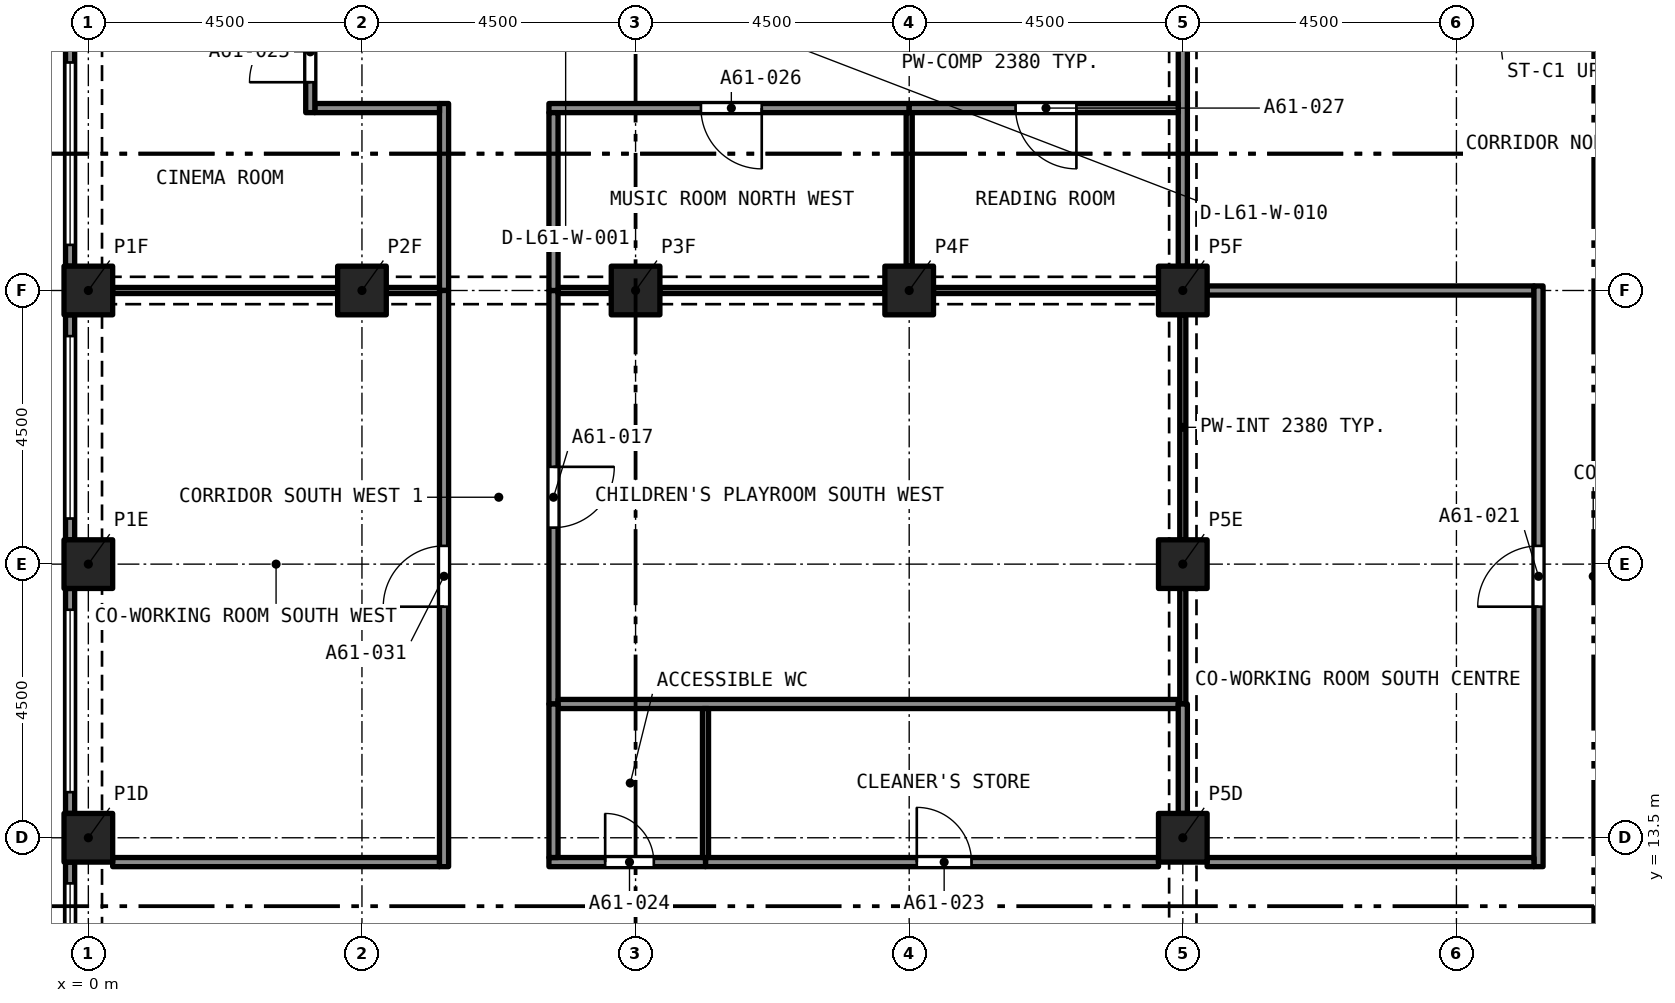
"""IFC4 building model, lengths in metres.
Left out: names, types, materials, properties, quantities, classifications, styles, units other than length and angle.
Written with IfcOpenShell. Run it as: python <this file> out.ifc"""

import sys

from ifc_helpers import new_model, si_unit, direction, frame, frame_2d, origin, origin_2d, place, context, subcontext, project, spatial, rectangle, extrude, element, fill, save


model = new_model("IFC4")
c1 = context("Model", 3, precision=1e-05, world=origin(), true_north=direction((0.0, 1.0)))
c2 = subcontext(c1, "Body", "Model", "MODEL_VIEW")
j1 = project(units=[si_unit("LENGTHUNIT", "METRE"), si_unit("PLANEANGLEUNIT", "RADIAN")], contexts=[c1])
p1 = place(None, origin())
s1 = spatial("IfcSite", under=j1, at=p1, CompositionType="ELEMENT")
p2 = place(p1, origin())
s2 = spatial("IfcBuilding", under=s1, at=p2, CompositionType="ELEMENT")
p3 = place(p2, frame((0.0, 0.0, 219.695)))
s3 = spatial("IfcBuildingStorey", under=s2, at=p3, CompositionType="ELEMENT", Elevation=219.695)
for number, where, z_axis, x_axis in (
    (1, (0.0, 13.5, 0.0), (0.0, 0.0, 1.0), (1.0, 0.0, 0.0)),
    (2, (18.0, 13.5, 0.0), (0.0, 0.0, 1.0), (1.0, 0.0, 0.0)),
    (3, (0.0, 18.0, 0.0), (0.0, 0.0, 1.0), (1.0, 0.0, 0.0)),
    (4, (18.0, 18.0, 0.0), (0.0, 0.0, 1.0), (1.0, 0.0, 0.0)),
    (5, (0.0, 22.5, 0.0), (0.0, 0.0, 1.0), (1.0, 0.0, 0.0)),
    (6, (4.5, 22.5, 0.0), (0.0, 0.0, 1.0), (1.0, 0.0, 0.0)),
    (7, (9.0, 22.5, 0.0), (0.0, 0.0, 1.0), (1.0, 0.0, 0.0)),
    (8, (13.5, 22.5, 0.0), (0.0, 0.0, 1.0), (1.0, 0.0, 0.0)),
    (9, (18.0, 22.5, 0.0), (0.0, 0.0, 1.0), (1.0, 0.0, 0.0)),
):
    element("IfcColumn", number, at=place(p3, frame(where, z_axis=z_axis, x_axis=x_axis)), inside=s3, PredefinedType="COLUMN", context=c2, shape_type="SweptSolid", body=[
        extrude(rectangle(XDim=0.8, YDim=0.8, at=origin_2d()), origin(), (0.0, 0.0, 1.0), 3.2),
    ])
p4 = place(p3, frame((-0.3, 22.9, 0.0), z_axis=(0.0, 0.0, 1.0), x_axis=(0.0, 1.0, 0.0)))
e10 = element("IfcWall", 10, at=p4, inside=s3, PredefinedType="SOLIDWALL", context=c2, shape_type="SweptSolid", body=[
    extrude(rectangle(XDim=3.7, YDim=0.15, at=frame_2d((1.85, 0.0))), origin(), (0.0, 0.0, 1.0), 3.2),
])
p5 = place(p4, frame((0.35, 0.0, 0.45)))
e11 = element("IfcOpeningElement", 11, at=p5, cuts=e10, PredefinedType="OPENING", context=c2, shape_type="SweptSolid", body=[
    extrude(rectangle(XDim=3.0, YDim=1.95, at=frame_2d((1.5, 0.975))), frame((0.0, 0.085, 0.0), z_axis=(0.0, -1.0, 0.0), x_axis=(1.0, 0.0, 0.0)), (0.0, 0.0, 1.0), 0.17),
])
p6 = place(p3, frame((-0.3, 18.4, 0.0), z_axis=(0.0, 0.0, 1.0), x_axis=(0.0, 1.0, 0.0)))
e12 = element("IfcWall", 12, at=p6, inside=s3, PredefinedType="SOLIDWALL", context=c2, shape_type="SweptSolid", body=[
    extrude(rectangle(XDim=3.7, YDim=0.15, at=frame_2d((1.85, 0.0))), origin(), (0.0, 0.0, 1.0), 3.2),
])
p7 = place(p6, frame((0.35, 0.0, 0.45)))
e13 = element("IfcOpeningElement", 13, at=p7, cuts=e12, PredefinedType="OPENING", context=c2, shape_type="SweptSolid", body=[
    extrude(rectangle(XDim=3.0, YDim=1.95, at=frame_2d((1.5, 0.975))), frame((0.0, 0.085, 0.0), z_axis=(0.0, -1.0, 0.0), x_axis=(1.0, 0.0, 0.0)), (0.0, 0.0, 1.0), 0.17),
])
p8 = place(p3, frame((-0.3, 13.9, 0.0), z_axis=(0.0, 0.0, 1.0), x_axis=(0.0, 1.0, 0.0)))
e14 = element("IfcWall", 14, at=p8, inside=s3, PredefinedType="SOLIDWALL", context=c2, shape_type="SweptSolid", body=[
    extrude(rectangle(XDim=3.7, YDim=0.15, at=frame_2d((1.85, 0.0))), origin(), (0.0, 0.0, 1.0), 3.2),
])
p9 = place(p8, frame((0.35, 0.0, 0.45)))
e15 = element("IfcOpeningElement", 15, at=p9, cuts=e14, PredefinedType="OPENING", context=c2, shape_type="SweptSolid", body=[
    extrude(rectangle(XDim=3.0, YDim=1.95, at=frame_2d((1.5, 0.975))), frame((0.0, 0.085, 0.0), z_axis=(0.0, -1.0, 0.0), x_axis=(1.0, 0.0, 0.0)), (0.0, 0.0, 1.0), 0.17),
])
p10 = place(p3, frame((-0.3, 9.4, 0.0), z_axis=(0.0, 0.0, 1.0), x_axis=(0.0, 1.0, 0.0)))
e16 = element("IfcWall", 16, at=p10, inside=s3, PredefinedType="SOLIDWALL", context=c2, shape_type="SweptSolid", body=[
    extrude(rectangle(XDim=3.7, YDim=0.15, at=frame_2d((1.85, 0.0))), origin(), (0.0, 0.0, 1.0), 3.2),
])
p11 = place(p10, frame((0.35, 0.0, 0.45)))
e17 = element("IfcOpeningElement", 17, at=p11, cuts=e16, PredefinedType="OPENING", context=c2, shape_type="SweptSolid", body=[
    extrude(rectangle(XDim=3.0, YDim=1.95, at=frame_2d((1.5, 0.975))), frame((0.0, 0.085, 0.0), z_axis=(0.0, -1.0, 0.0), x_axis=(1.0, 0.0, 0.0)), (0.0, 0.0, 1.0), 0.17),
])
p12 = place(p3, frame((18.0, 18.4, 0.0), z_axis=(0.0, 0.0, 1.0), x_axis=(0.0, 1.0, 0.0)))
e18 = element("IfcWall", 18, at=p12, inside=s3, PredefinedType="PARTITIONING", context=c2, shape_type="SweptSolid", body=[
    extrude(rectangle(XDim=3.7, YDim=0.1, at=frame_2d((1.85, 0.0))), origin(), (0.0, 0.0, 1.0), 2.38),
])
p13 = place(p3, frame((18.0, 15.7, 0.0), z_axis=(0.0, 0.0, 1.0), x_axis=(0.0, 1.0, 0.0)))
e19 = element("IfcWall", 19, at=p13, inside=s3, PredefinedType="PARTITIONING", context=c2, shape_type="SweptSolid", body=[
    extrude(rectangle(XDim=1.9, YDim=0.1, at=frame_2d((0.95, 0.0))), origin(), (0.0, 0.0, 1.0), 2.38),
])
p14 = place(p3, frame((7.65, 22.5, 0.0), z_axis=(0.0, 0.0, 1.0), x_axis=(0.0, -1.0, 0.0)))
e20 = element("IfcWall", 20, at=p14, inside=s3, PredefinedType="PARTITIONING", context=c2, shape_type="SweptSolid", body=[
    extrude(rectangle(XDim=6.8, YDim=0.15, at=frame_2d((3.4, 0.0))), origin(), (0.0, 0.0, 1.0), 2.9),
])
p15 = place(p14, frame((2.9, 0.0, 0.0)))
e21 = element("IfcOpeningElement", 21, at=p15, cuts=e20, PredefinedType="OPENING", context=c2, shape_type="SweptSolid", body=[
    extrude(rectangle(XDim=1.0, YDim=2.1, at=frame_2d((0.5, 1.05))), frame((0.0, 0.085, 0.0), z_axis=(0.0, -1.0, 0.0), x_axis=(1.0, 0.0, 0.0)), (0.0, 0.0, 1.0), 0.17),
])
p16 = place(p3, frame((7.725, 22.5, 0.0), z_axis=(0.0, 0.0, 1.0), x_axis=(1.0, 0.0, 0.0)))
e22 = element("IfcWall", 22, at=p16, inside=s3, PredefinedType="PARTITIONING", context=c2, shape_type="SweptSolid", body=[
    extrude(rectangle(XDim=0.875, YDim=0.1, at=frame_2d((0.438, 0.0))), origin(), (0.0, 0.0, 1.0), 2.38),
])
for number, where, z_axis, x_axis in (
    (23, (9.4, 22.5, 0.0), (0.0, 0.0, 1.0), (1.0, 0.0, 0.0)),
    (24, (13.9, 22.5, 0.0), (0.0, 0.0, 1.0), (1.0, 0.0, 0.0)),
):
    element("IfcWall", number, at=place(p3, frame(where, z_axis=z_axis, x_axis=x_axis)), inside=s3, PredefinedType="PARTITIONING", context=c2, shape_type="SweptSolid", body=[
        extrude(rectangle(XDim=3.7, YDim=0.1, at=frame_2d((1.85, 0.0))), origin(), (0.0, 0.0, 1.0), 2.38),
    ])
p17 = place(p3, frame((7.725, 15.7, 0.0), z_axis=(0.0, 0.0, 1.0), x_axis=(1.0, 0.0, 0.0)))
e25 = element("IfcWall", 25, at=p17, inside=s3, PredefinedType="PARTITIONING", context=c2, shape_type="SweptSolid", body=[
    extrude(rectangle(XDim=10.2, YDim=0.15, at=frame_2d((5.1, 0.0))), origin(), (0.0, 0.0, 1.0), 2.9),
])
p18 = place(p3, frame((18.4, 22.5, 0.0), z_axis=(0.0, 0.0, 1.0), x_axis=(1.0, 0.0, 0.0)))
e26 = element("IfcWall", 26, at=p18, inside=s3, PredefinedType="PARTITIONING", context=c2, shape_type="SweptSolid", body=[
    extrude(rectangle(XDim=5.375, YDim=0.15, at=frame_2d((2.688, 0.0))), origin(), (0.0, 0.0, 1.0), 2.75),
])
p19 = place(p3, frame((18.0, 22.9, 0.0), z_axis=(0.0, 0.0, 1.0), x_axis=(0.0, 1.0, 0.0)))
e27 = element("IfcWall", 27, at=p19, inside=s3, PredefinedType="PARTITIONING", context=c2, shape_type="SweptSolid", body=[
    extrude(rectangle(XDim=3.7, YDim=0.15, at=frame_2d((1.85, 0.0))), origin(), (0.0, 0.0, 1.0), 2.38),
])
p20 = place(p3, frame((23.85, 13.025, 0.0), z_axis=(0.0, 0.0, 1.0), x_axis=(0.0, 1.0, 0.0)))
e28 = element("IfcWall", 28, at=p20, inside=s3, PredefinedType="PARTITIONING", context=c2, shape_type="SweptSolid", body=[
    extrude(rectangle(XDim=9.55, YDim=0.15, at=frame_2d((4.775, 0.0))), origin(), (0.0, 0.0, 1.0), 2.75),
])
p21 = place(p20, frame((4.275, 0.0, 0.0)))
e29 = element("IfcOpeningElement", 29, at=p21, cuts=e28, PredefinedType="OPENING", context=c2, shape_type="SweptSolid", body=[
    extrude(rectangle(XDim=1.0, YDim=2.1, at=frame_2d((0.5, 1.05))), frame((0.0, 0.085, 0.0), z_axis=(0.0, -1.0, 0.0), x_axis=(1.0, 0.0, 0.0)), (0.0, 0.0, 1.0), 0.17),
])
p22 = place(p3, frame((18.4, 13.1, 0.0), z_axis=(0.0, 0.0, 1.0), x_axis=(1.0, 0.0, 0.0)))
e30 = element("IfcWall", 30, at=p22, inside=s3, PredefinedType="PARTITIONING", context=c2, shape_type="SweptSolid", body=[
    extrude(rectangle(XDim=5.375, YDim=0.15, at=frame_2d((2.688, 0.0))), origin(), (0.0, 0.0, 1.0), 2.75),
])
p23 = place(p3, frame((10.15, 13.1, 0.0), z_axis=(0.0, 0.0, 1.0), x_axis=(1.0, 0.0, 0.0)))
e31 = element("IfcWall", 31, at=p23, inside=s3, PredefinedType="PARTITIONING", context=c2, shape_type="SweptSolid", body=[
    extrude(rectangle(XDim=7.45, YDim=0.15, at=frame_2d((3.725, 0.0))), origin(), (0.0, 0.0, 1.0), 2.9),
])
p24 = place(p23, frame((3.475, 0.0, 0.0)))
e32 = element("IfcOpeningElement", 32, at=p24, cuts=e31, PredefinedType="OPENING", context=c2, shape_type="SweptSolid", body=[
    extrude(rectangle(XDim=0.9, YDim=2.1, at=frame_2d((0.45, 1.05))), frame((0.0, 0.085, 0.0), z_axis=(0.0, -1.0, 0.0), x_axis=(1.0, 0.0, 0.0)), (0.0, 0.0, 1.0), 0.17),
])
p25 = place(p3, frame((7.575, 13.1, 0.0), z_axis=(0.0, 0.0, 1.0), x_axis=(1.0, 0.0, 0.0)))
e33 = element("IfcWall", 33, at=p25, inside=s3, PredefinedType="PARTITIONING", context=c2, shape_type="SweptSolid", body=[
    extrude(rectangle(XDim=2.575, YDim=0.15, at=frame_2d((1.288, 0.0))), origin(), (0.0, 0.0, 1.0), 2.9),
])
p26 = place(p25, frame((0.925, 0.0, 0.0)))
e34 = element("IfcOpeningElement", 34, at=p26, cuts=e33, PredefinedType="OPENING", context=c2, shape_type="SweptSolid", body=[
    extrude(rectangle(XDim=0.8, YDim=2.1, at=frame_2d((0.4, 1.05))), frame((0.0, 0.085, 0.0), z_axis=(0.0, -1.0, 0.0), x_axis=(1.0, 0.0, 0.0)), (0.0, 0.0, 1.0), 0.17),
])
p27 = place(p3, frame((0.4, 13.1, 0.0), z_axis=(0.0, 0.0, 1.0), x_axis=(1.0, 0.0, 0.0)))
e35 = element("IfcWall", 35, at=p27, inside=s3, PredefinedType="PARTITIONING", context=c2, shape_type="SweptSolid", body=[
    extrude(rectangle(XDim=5.375, YDim=0.15, at=frame_2d((2.688, 0.0))), origin(), (0.0, 0.0, 1.0), 2.9),
])
p28 = place(p3, frame((18.0, 13.9, 0.0), z_axis=(0.0, 0.0, 1.0), x_axis=(0.0, 1.0, 0.0)))
e36 = element("IfcWall", 36, at=p28, inside=s3, PredefinedType="PARTITIONING", context=c2, shape_type="SweptSolid", body=[
    extrude(rectangle(XDim=1.8, YDim=0.15, at=frame_2d((0.9, 0.0))), origin(), (0.0, 0.0, 1.0), 2.38),
])
p29 = place(p3, frame((5.85, 22.5, 0.0), z_axis=(0.0, 0.0, 1.0), x_axis=(0.0, 1.0, 0.0)))
e37 = element("IfcWall", 37, at=p29, inside=s3, PredefinedType="PARTITIONING", context=c2, shape_type="SweptSolid", body=[
    extrude(rectangle(XDim=3.075, YDim=0.15, at=frame_2d((1.538, 0.0))), origin(), (0.0, 0.0, 1.0), 2.9),
])
p30 = place(p3, frame((3.725, 25.5, 0.0), z_axis=(0.0, 0.0, 1.0), x_axis=(1.0, 0.0, 0.0)))
e38 = element("IfcWall", 38, at=p30, inside=s3, PredefinedType="PARTITIONING", context=c2, shape_type="SweptSolid", body=[
    extrude(rectangle(XDim=2.05, YDim=0.15, at=frame_2d((1.025, 0.0))), origin(), (0.0, 0.0, 1.0), 2.9),
])
p31 = place(p3, frame((3.65, 25.425, 0.0), z_axis=(0.0, 0.0, 1.0), x_axis=(0.0, 1.0, 0.0)))
e39 = element("IfcWall", 39, at=p31, inside=s3, PredefinedType="PARTITIONING", context=c2, shape_type="SweptSolid", body=[
    extrude(rectangle(XDim=1.925, YDim=0.15, at=frame_2d((0.962, 0.0))), origin(), (0.0, 0.0, 1.0), 2.9),
])
p32 = place(p31, frame((0.5, 0.0, 0.0)))
e40 = element("IfcOpeningElement", 40, at=p32, cuts=e39, PredefinedType="OPENING", context=c2, shape_type="SweptSolid", body=[
    extrude(rectangle(XDim=1.0, YDim=2.1, at=frame_2d((0.5, 1.05))), frame((0.0, 0.085, 0.0), z_axis=(0.0, -1.0, 0.0), x_axis=(1.0, 0.0, 0.0)), (0.0, 0.0, 1.0), 0.17),
])
p33 = place(p3, frame((13.5, 25.5, 0.0), z_axis=(0.0, 0.0, 1.0), x_axis=(-1.0, 0.0, 0.0)))
e41 = element("IfcWall", 41, at=p33, inside=s3, PredefinedType="PARTITIONING", context=c2, shape_type="SweptSolid", body=[
    extrude(rectangle(XDim=5.925, YDim=0.15, at=frame_2d((2.962, 0.0))), origin(), (0.0, 0.0, 1.0), 2.9),
])
p34 = place(p33, frame((2.425, 0.0, 0.0)))
e42 = element("IfcOpeningElement", 42, at=p34, cuts=e41, PredefinedType="OPENING", context=c2, shape_type="SweptSolid", body=[
    extrude(rectangle(XDim=1.0, YDim=2.1, at=frame_2d((0.5, 1.05))), frame((0.0, 0.085, 0.0), z_axis=(0.0, -1.0, 0.0), x_axis=(1.0, 0.0, 0.0)), (0.0, 0.0, 1.0), 0.17),
])
p35 = place(p3, frame((7.65, 22.5, 0.0), z_axis=(0.0, 0.0, 1.0), x_axis=(0.0, 1.0, 0.0)))
e43 = element("IfcWall", 43, at=p35, inside=s3, PredefinedType="PARTITIONING", context=c2, shape_type="SweptSolid", body=[
    extrude(rectangle(XDim=2.925, YDim=0.15, at=frame_2d((1.462, 0.0))), origin(), (0.0, 0.0, 1.0), 2.9),
])
p36 = place(p3, frame((17.925, 25.5, 0.0), z_axis=(0.0, 0.0, 1.0), x_axis=(-1.0, 0.0, 0.0)))
e44 = element("IfcWall", 44, at=p36, inside=s3, PredefinedType="PARTITIONING", context=c2, shape_type="SweptSolid", body=[
    extrude(rectangle(XDim=4.425, YDim=0.15, at=frame_2d((2.212, 0.0))), origin(), (0.0, 0.0, 1.0), 2.9),
])
p37 = place(p36, frame((1.675, 0.0, 0.0)))
e45 = element("IfcOpeningElement", 45, at=p37, cuts=e44, PredefinedType="OPENING", context=c2, shape_type="SweptSolid", body=[
    extrude(rectangle(XDim=1.0, YDim=2.1, at=frame_2d((0.5, 1.05))), frame((0.0, 0.085, 0.0), z_axis=(0.0, -1.0, 0.0), x_axis=(1.0, 0.0, 0.0)), (0.0, 0.0, 1.0), 0.17),
])
p38 = place(p3, frame((7.65, 13.175, 0.0), z_axis=(0.0, 0.0, 1.0), x_axis=(0.0, 1.0, 0.0)))
e46 = element("IfcWall", 46, at=p38, inside=s3, PredefinedType="PARTITIONING", context=c2, shape_type="SweptSolid", body=[
    extrude(rectangle(XDim=2.525, YDim=0.15, at=frame_2d((1.262, 0.0))), origin(), (0.0, 0.0, 1.0), 2.9),
])
p39 = place(p3, frame((5.85, 13.025, 0.0), z_axis=(0.0, 0.0, 1.0), x_axis=(0.0, 1.0, 0.0)))
e47 = element("IfcWall", 47, at=p39, inside=s3, PredefinedType="PARTITIONING", context=c2, shape_type="SweptSolid", body=[
    extrude(rectangle(XDim=9.475, YDim=0.15, at=frame_2d((4.738, 0.0))), origin(), (0.0, 0.0, 1.0), 2.9),
])
p40 = place(p39, frame((4.275, 0.0, 0.0)))
e48 = element("IfcOpeningElement", 48, at=p40, cuts=e47, PredefinedType="OPENING", context=c2, shape_type="SweptSolid", body=[
    extrude(rectangle(XDim=1.0, YDim=2.1, at=frame_2d((0.5, 1.05))), frame((0.0, 0.085, 0.0), z_axis=(0.0, -1.0, 0.0), x_axis=(1.0, 0.0, 0.0)), (0.0, 0.0, 1.0), 0.17),
])
p41 = place(p3, frame((4.9, 22.5, 0.0), z_axis=(0.0, 0.0, 1.0), x_axis=(1.0, 0.0, 0.0)))
e49 = element("IfcWall", 49, at=p41, inside=s3, PredefinedType="PARTITIONING", context=c2, shape_type="SweptSolid", body=[
    extrude(rectangle(XDim=0.875, YDim=0.1, at=frame_2d((0.438, 0.0))), origin(), (0.0, 0.0, 1.0), 2.38),
])
p42 = place(p3, frame((0.4, 22.5, 0.0), z_axis=(0.0, 0.0, 1.0), x_axis=(1.0, 0.0, 0.0)))
e50 = element("IfcWall", 50, at=p42, inside=s3, PredefinedType="PARTITIONING", context=c2, shape_type="SweptSolid", body=[
    extrude(rectangle(XDim=3.7, YDim=0.1, at=frame_2d((1.85, 0.0))), origin(), (0.0, 0.0, 1.0), 2.38),
])
p43 = place(p3, frame((13.5, 22.9, 0.0), z_axis=(0.0, 0.0, 1.0), x_axis=(0.0, 1.0, 0.0)))
e51 = element("IfcWall", 51, at=p43, inside=s3, PredefinedType="PARTITIONING", context=c2, shape_type="SweptSolid", body=[
    extrude(rectangle(XDim=2.525, YDim=0.1, at=frame_2d((1.263, 0.0))), origin(), (0.0, 0.0, 1.0), 2.9),
])
p44 = place(p3, frame((10.15, 13.175, 0.0), z_axis=(0.0, 0.0, 1.0), x_axis=(0.0, 1.0, 0.0)))
e52 = element("IfcWall", 52, at=p44, inside=s3, PredefinedType="PARTITIONING", context=c2, shape_type="SweptSolid", body=[
    extrude(rectangle(XDim=2.45, YDim=0.1, at=frame_2d((1.225, 0.0))), origin(), (0.0, 0.0, 1.0), 2.9),
])
p45 = place(p5, origin())
e53 = element("IfcWindow", 53, at=p45, inside=s3, PartitioningType="SINGLE_PANEL", PredefinedType="WINDOW", context=c2, shape_type="SweptSolid", body=[
    extrude(rectangle(XDim=3.0, YDim=1.95, at=frame_2d((1.5, 0.975))), frame((0.0, 0.03, 0.0), z_axis=(0.0, -1.0, 0.0), x_axis=(1.0, 0.0, 0.0)), (0.0, 0.0, 1.0), 0.06),
])
fill(e11, e53)
p46 = place(p7, origin())
e54 = element("IfcWindow", 54, at=p46, inside=s3, PartitioningType="SINGLE_PANEL", PredefinedType="WINDOW", context=c2, shape_type="SweptSolid", body=[
    extrude(rectangle(XDim=3.0, YDim=1.95, at=frame_2d((1.5, 0.975))), frame((0.0, 0.03, 0.0), z_axis=(0.0, -1.0, 0.0), x_axis=(1.0, 0.0, 0.0)), (0.0, 0.0, 1.0), 0.06),
])
fill(e13, e54)
p47 = place(p9, origin())
e55 = element("IfcWindow", 55, at=p47, inside=s3, PartitioningType="SINGLE_PANEL", PredefinedType="WINDOW", context=c2, shape_type="SweptSolid", body=[
    extrude(rectangle(XDim=3.0, YDim=1.95, at=frame_2d((1.5, 0.975))), frame((0.0, 0.03, 0.0), z_axis=(0.0, -1.0, 0.0), x_axis=(1.0, 0.0, 0.0)), (0.0, 0.0, 1.0), 0.06),
])
fill(e15, e55)
p48 = place(p11, origin())
e56 = element("IfcWindow", 56, at=p48, inside=s3, PartitioningType="SINGLE_PANEL", PredefinedType="WINDOW", context=c2, shape_type="SweptSolid", body=[
    extrude(rectangle(XDim=3.0, YDim=1.95, at=frame_2d((1.5, 0.975))), frame((0.0, 0.03, 0.0), z_axis=(0.0, -1.0, 0.0), x_axis=(1.0, 0.0, 0.0)), (0.0, 0.0, 1.0), 0.06),
])
fill(e17, e56)
p49 = place(p15, origin())
e57 = element("IfcDoor", 57, at=p49, inside=s3, OperationType="SINGLE_SWING_LEFT", PredefinedType="DOOR", context=c2, shape_type="SweptSolid", body=[
    extrude(rectangle(XDim=1.0, YDim=2.1, at=frame_2d((0.5, 1.05))), frame((0.0, 0.025, 0.0), z_axis=(0.0, -1.0, 0.0), x_axis=(1.0, 0.0, 0.0)), (0.0, 0.0, 1.0), 0.05),
])
fill(e21, e57)
p50 = place(p21, origin())
e58 = element("IfcDoor", 58, at=p50, inside=s3, OperationType="SINGLE_SWING_RIGHT", PredefinedType="DOOR", context=c2, shape_type="SweptSolid", body=[
    extrude(rectangle(XDim=1.0, YDim=2.1, at=frame_2d((0.5, 1.05))), frame((0.0, 0.025, 0.0), z_axis=(0.0, -1.0, 0.0), x_axis=(1.0, 0.0, 0.0)), (0.0, 0.0, 1.0), 0.05),
])
fill(e29, e58)
p51 = place(p24, origin())
e59 = element("IfcDoor", 59, at=p51, inside=s3, OperationType="SINGLE_SWING_RIGHT", PredefinedType="DOOR", context=c2, shape_type="SweptSolid", body=[
    extrude(rectangle(XDim=0.9, YDim=2.1, at=frame_2d((0.45, 1.05))), frame((0.0, 0.025, 0.0), z_axis=(0.0, -1.0, 0.0), x_axis=(1.0, 0.0, 0.0)), (0.0, 0.0, 1.0), 0.05),
])
fill(e32, e59)
p52 = place(p26, origin())
e60 = element("IfcDoor", 60, at=p52, inside=s3, OperationType="SINGLE_SWING_RIGHT", PredefinedType="DOOR", context=c2, shape_type="SweptSolid", body=[
    extrude(rectangle(XDim=0.8, YDim=2.1, at=frame_2d((0.4, 1.05))), frame((0.0, 0.025, 0.0), z_axis=(0.0, -1.0, 0.0), x_axis=(1.0, 0.0, 0.0)), (0.0, 0.0, 1.0), 0.05),
])
fill(e34, e60)
p53 = place(p32, origin())
e61 = element("IfcDoor", 61, at=p53, inside=s3, OperationType="SINGLE_SWING_RIGHT", PredefinedType="DOOR", context=c2, shape_type="SweptSolid", body=[
    extrude(rectangle(XDim=1.0, YDim=2.1, at=frame_2d((0.5, 1.05))), frame((0.0, 0.025, 0.0), z_axis=(0.0, -1.0, 0.0), x_axis=(1.0, 0.0, 0.0)), (0.0, 0.0, 1.0), 0.05),
])
fill(e40, e61)
p54 = place(p34, origin())
e62 = element("IfcDoor", 62, at=p54, inside=s3, OperationType="SINGLE_SWING_LEFT", PredefinedType="DOOR", context=c2, shape_type="SweptSolid", body=[
    extrude(rectangle(XDim=1.0, YDim=2.1, at=frame_2d((0.5, 1.05))), frame((0.0, 0.025, 0.0), z_axis=(0.0, -1.0, 0.0), x_axis=(1.0, 0.0, 0.0)), (0.0, 0.0, 1.0), 0.05),
])
fill(e42, e62)
p55 = place(p37, origin())
e63 = element("IfcDoor", 63, at=p55, inside=s3, OperationType="SINGLE_SWING_LEFT", PredefinedType="DOOR", context=c2, shape_type="SweptSolid", body=[
    extrude(rectangle(XDim=1.0, YDim=2.1, at=frame_2d((0.5, 1.05))), frame((0.0, 0.025, 0.0), z_axis=(0.0, -1.0, 0.0), x_axis=(1.0, 0.0, 0.0)), (0.0, 0.0, 1.0), 0.05),
])
fill(e45, e63)
p56 = place(p40, origin())
e64 = element("IfcDoor", 64, at=p56, inside=s3, OperationType="SINGLE_SWING_RIGHT", PredefinedType="DOOR", context=c2, shape_type="SweptSolid", body=[
    extrude(rectangle(XDim=1.0, YDim=2.1, at=frame_2d((0.5, 1.05))), frame((0.0, 0.025, 0.0), z_axis=(0.0, -1.0, 0.0), x_axis=(1.0, 0.0, 0.0)), (0.0, 0.0, 1.0), 0.05),
])
fill(e48, e64)
save(model, sys.argv[1])
